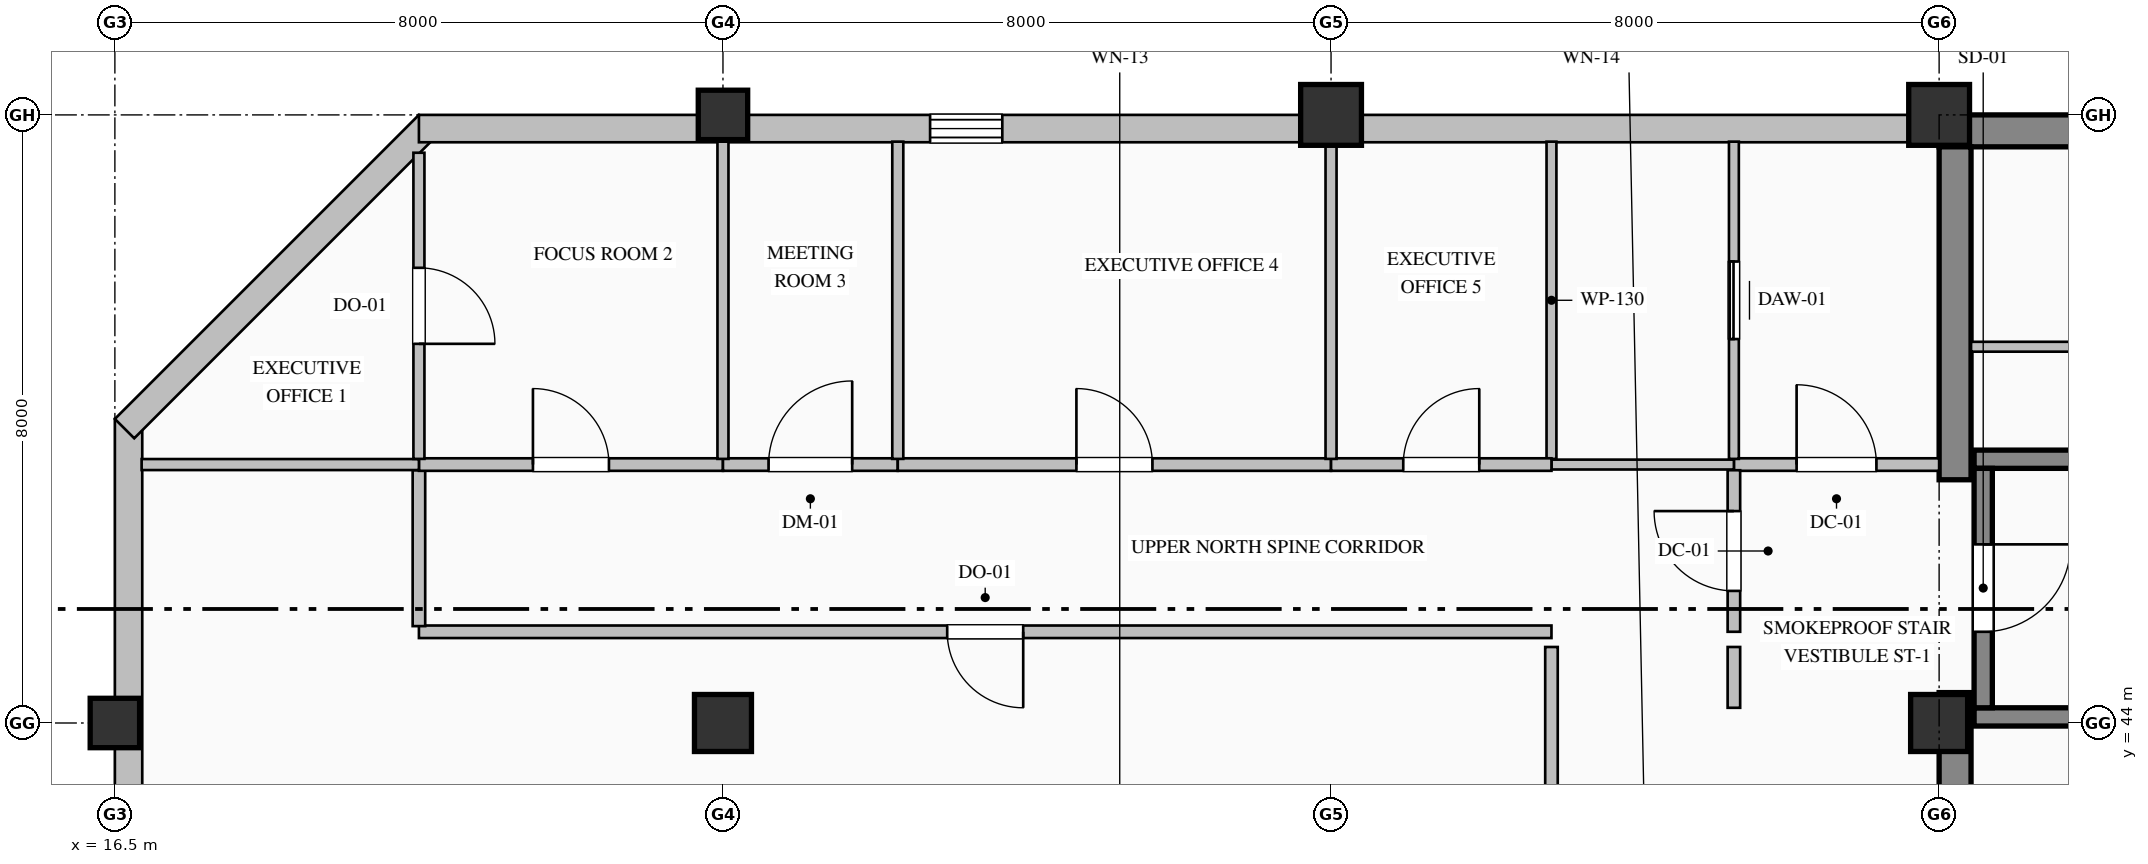
"""IFC4 building model, lengths in metres.
Left out: names, types, materials, properties, quantities, classifications, styles, units other than length and angle.
Written with IfcOpenShell. Run it as: python <this file> out.ifc"""

import sys

from ifc_helpers import new_model, si_unit, direction, frame, frame_2d, origin, origin_2d, place, context, subcontext, project, spatial, rectangle, hollow_rectangle, extrude, element, fill, save


model = new_model("IFC4")
c1 = context("Model", 3, precision=1e-05, world=origin(), true_north=direction((0.0, 1.0)))
c2 = subcontext(c1, "Body", "Model", "MODEL_VIEW")
j1 = project(units=[si_unit("LENGTHUNIT", "METRE"), si_unit("PLANEANGLEUNIT", "RADIAN")], contexts=[c1])
p1 = place(None, origin())
s1 = spatial("IfcSite", under=j1, at=p1, CompositionType="ELEMENT")
p2 = place(p1, origin())
s2 = spatial("IfcBuilding", under=s1, at=p2, CompositionType="ELEMENT")
p3 = place(p2, frame((0.0, 0.0, 299.2)))
s3 = spatial("IfcBuildingStorey", under=s2, at=p3, CompositionType="ELEMENT", Elevation=299.2)
p4 = place(p3, frame((40.5, 51.79, 0.0), z_axis=(0.0, 0.0, 1.0), x_axis=(1.0, 0.0, 0.0)))
e1 = element("IfcWall", 1, at=p4, inside=s3, PredefinedType="SHEAR", context=c2, shape_type="SweptSolid", body=[
    extrude(rectangle(XDim=23.5, YDim=0.42, at=frame_2d((11.75, 0.0))), origin(), (0.0, 0.0, 1.0), 3.785),
])
p5 = place(p3, frame((40.71, 36.42, 0.0), z_axis=(0.0, 0.0, 1.0), x_axis=(0.0, 1.0, 0.0)))
e2 = element("IfcWall", 2, at=p5, inside=s3, PredefinedType="SHEAR", context=c2, shape_type="SweptSolid", body=[
    extrude(rectangle(XDim=7.98, YDim=0.42, at=frame_2d((3.99, 0.0))), origin(), (0.0, 0.0, 1.0), 3.785),
])
p6 = place(p3, frame((40.71, 47.2, 0.0), z_axis=(0.0, 0.0, 1.0), x_axis=(0.0, 1.0, 0.0)))
e3 = element("IfcWall", 3, at=p6, inside=s3, PredefinedType="SHEAR", context=c2, shape_type="SweptSolid", body=[
    extrude(rectangle(XDim=4.38, YDim=0.42, at=frame_2d((2.19, 0.0))), origin(), (0.0, 0.0, 1.0), 3.785),
])
p7 = place(p3, frame((16.5, 44.0, 0.0), z_axis=(0.0, 0.0, 1.0), x_axis=(1.0, 0.0, 0.0)))
e4 = element("IfcColumn", 4, at=p7, inside=s3, PredefinedType="COLUMN", context=c2, shape_type="SweptSolid", body=[
    extrude(hollow_rectangle(XDim=0.65, YDim=0.65, WallThickness=0.028, at=origin_2d()), origin(), (0.0, 0.0, 1.0), 4.0),
])
p8 = place(p3, frame((24.5, 44.0, 0.0), z_axis=(0.0, 0.0, 1.0), x_axis=(1.0, 0.0, 0.0)))
e5 = element("IfcColumn", 5, at=p8, inside=s3, PredefinedType="COLUMN", context=c2, shape_type="SweptSolid", body=[
    extrude(rectangle(XDim=0.75, YDim=0.75, at=origin_2d()), origin(), (0.0, 0.0, 1.0), 4.0),
])
p9 = place(p3, frame((24.5, 52.0, 0.0), z_axis=(0.0, 0.0, 1.0), x_axis=(1.0, 0.0, 0.0)))
e6 = element("IfcColumn", 6, at=p9, inside=s3, PredefinedType="COLUMN", context=c2, shape_type="SweptSolid", body=[
    extrude(hollow_rectangle(XDim=0.65, YDim=0.65, WallThickness=0.028, at=origin_2d()), origin(), (0.0, 0.0, 1.0), 4.0),
])
p10 = place(p3, frame((32.5, 52.0, 0.0), z_axis=(0.0, 0.0, 1.0), x_axis=(1.0, 0.0, 0.0)))
e7 = element("IfcColumn", 7, at=p10, inside=s3, PredefinedType="COLUMN", context=c2, shape_type="SweptSolid", body=[
    extrude(hollow_rectangle(XDim=0.8, YDim=0.8, WallThickness=0.032, at=origin_2d()), origin(), (0.0, 0.0, 1.0), 4.0),
])
p11 = place(p3, frame((40.5, 44.0, 0.0), z_axis=(0.0, 0.0, 1.0), x_axis=(1.0, 0.0, 0.0)))
e8 = element("IfcColumn", 8, at=p11, inside=s3, PredefinedType="COLUMN", context=c2, shape_type="SweptSolid", body=[
    extrude(rectangle(XDim=0.75, YDim=0.75, at=origin_2d()), origin(), (0.0, 0.0, 1.0), 4.0),
])
p12 = place(p3, frame((40.5, 52.0, 0.0), z_axis=(0.0, 0.0, 1.0), x_axis=(1.0, 0.0, 0.0)))
e9 = element("IfcColumn", 9, at=p12, inside=s3, PredefinedType="COLUMN", context=c2, shape_type="SweptSolid", body=[
    extrude(hollow_rectangle(XDim=0.8, YDim=0.8, WallThickness=0.032, at=origin_2d()), origin(), (0.0, 0.0, 1.0), 4.0),
])
p13 = place(p3, frame((16.68, 32.0, 0.0), z_axis=(0.0, 0.0, 1.0), x_axis=(0.0, 1.0, 0.0)))
e10 = element("IfcWall", 10, at=p13, inside=s3, PredefinedType="SOLIDWALL", context=c2, shape_type="SweptSolid", body=[
    extrude(rectangle(XDim=16.0, YDim=0.36, at=frame_2d((8.0, 0.0))), origin(), (0.0, 0.0, 1.0), 3.335),
])
p14 = place(p13, frame((6.675, 0.0, 0.8)))
e11 = element("IfcOpeningElement", 11, at=p14, cuts=e10, PredefinedType="OPENING", context=c2, shape_type="SweptSolid", body=[
    extrude(rectangle(XDim=1.05, YDim=2.15, at=frame_2d((0.525, 1.075))), frame((0.0, 0.19, 0.0), z_axis=(0.0, -1.0, 0.0), x_axis=(1.0, 0.0, 0.0)), (0.0, 0.0, 1.0), 0.38),
])
p15 = place(p3, frame((16.627, 47.873, 0.0), z_axis=(0.0, 0.0, 1.0), x_axis=(0.707106781187, 0.707106781187, 0.0)))
e12 = element("IfcWall", 12, at=p15, inside=s3, PredefinedType="SOLIDWALL", context=c2, shape_type="SweptSolid", body=[
    extrude(rectangle(XDim=5.657, YDim=0.36, at=frame_2d((2.828, 0.0))), origin(), (0.0, 0.0, 1.0), 3.785),
])
p16 = place(p3, frame((20.5, 51.82, 0.0), z_axis=(0.0, 0.0, 1.0), x_axis=(1.0, 0.0, 0.0)))
e13 = element("IfcWall", 13, at=p16, inside=s3, PredefinedType="SOLIDWALL", context=c2, shape_type="SweptSolid", body=[
    extrude(rectangle(XDim=20.02, YDim=0.36, at=frame_2d((10.01, 0.0))), origin(), (0.0, 0.0, 1.0), 3.335),
])
p17 = place(p16, frame((6.725, 0.0, 0.9)))
e14 = element("IfcOpeningElement", 14, at=p17, cuts=e13, PredefinedType="OPENING", context=c2, shape_type="SweptSolid", body=[
    extrude(rectangle(XDim=0.95, YDim=1.85, at=frame_2d((0.475, 0.925))), frame((0.0, 0.19, 0.0), z_axis=(0.0, -1.0, 0.0), x_axis=(1.0, 0.0, 0.0)), (0.0, 0.0, 1.0), 0.38),
])
for number, where, z_axis, x_axis in (
    (15, (40.96, 47.47, 0.0), (0.0, 0.0, 1.0), (1.0, 0.0, 0.0)),
    (16, (49.04, 44.08, 0.0), (0.0, 0.0, 1.0), (-1.0, 0.0, 0.0)),
):
    element("IfcWall", number, at=place(p3, frame(where, z_axis=z_axis, x_axis=x_axis)), inside=s3, PredefinedType="SOLIDWALL", context=c2, shape_type="SweptSolid", body=[
        extrude(rectangle(XDim=8.08, YDim=0.24, at=frame_2d((4.04, 0.0))), origin(), (0.0, 0.0, 1.0), 4.0),
    ])
p18 = place(p3, frame((41.08, 47.35, 0.0), z_axis=(0.0, 0.0, 1.0), x_axis=(0.0, -1.0, 0.0)))
e17 = element("IfcWall", 17, at=p18, inside=s3, PredefinedType="SOLIDWALL", context=c2, shape_type="SweptSolid", body=[
    extrude(rectangle(XDim=3.15, YDim=0.24, at=frame_2d((1.575, 0.0))), origin(), (0.0, 0.0, 1.0), 4.0),
])
p19 = place(p18, frame((1.0, 0.0, 0.0)))
e18 = element("IfcOpeningElement", 18, at=p19, cuts=e17, PredefinedType="OPENING", context=c2, shape_type="SweptSolid", body=[
    extrude(rectangle(XDim=1.15, YDim=2.2, at=frame_2d((0.575, 1.1))), frame((0.0, 0.13, 0.0), z_axis=(0.0, -1.0, 0.0), x_axis=(1.0, 0.0, 0.0)), (0.0, 0.0, 1.0), 0.26),
])
p20 = place(p3, frame((37.8, 47.4, 0.0), z_axis=(0.0, 0.0, 1.0), x_axis=(1.0, 0.0, 0.0)))
e19 = element("IfcWall", 19, at=p20, inside=s3, PredefinedType="PARTITIONING", context=c2, shape_type="SweptSolid", body=[
    extrude(rectangle(XDim=2.7, YDim=0.165, at=frame_2d((1.35, 0.0))), origin(), (0.0, 0.0, 1.0), 3.785),
])
p21 = place(p20, frame((0.825, 0.0, 0.0)))
e20 = element("IfcOpeningElement", 20, at=p21, cuts=e19, PredefinedType="OPENING", context=c2, shape_type="SweptSolid", body=[
    extrude(rectangle(XDim=1.05, YDim=2.15, at=frame_2d((0.525, 1.075))), frame((0.0, 0.093, 0.0), z_axis=(0.0, -1.0, 0.0), x_axis=(1.0, 0.0, 0.0)), (0.0, 0.0, 1.0), 0.185),
])
p22 = place(p3, frame((37.8, 45.2, 0.0), z_axis=(0.0, 0.0, 1.0), x_axis=(0.0, 1.0, 0.0)))
e21 = element("IfcWall", 21, at=p22, inside=s3, PredefinedType="PARTITIONING", context=c2, shape_type="SweptSolid", body=[
    extrude(rectangle(XDim=2.125, YDim=0.165, at=frame_2d((1.063, 0.0))), origin(), (0.0, 0.0, 1.0), 3.785),
])
p23 = place(p22, frame((0.538, 0.0, 0.0)))
e22 = element("IfcOpeningElement", 22, at=p23, cuts=e21, PredefinedType="OPENING", context=c2, shape_type="SweptSolid", body=[
    extrude(rectangle(XDim=1.05, YDim=2.15, at=frame_2d((0.525, 1.075))), frame((0.0, 0.093, 0.0), z_axis=(0.0, -1.0, 0.0), x_axis=(1.0, 0.0, 0.0)), (0.0, 0.0, 1.0), 0.185),
])
p24 = place(p3, frame((37.8, 44.2, 0.0), z_axis=(0.0, 0.0, 1.0), x_axis=(0.0, 1.0, 0.0)))
e23 = element("IfcWall", 23, at=p24, inside=s3, PredefinedType="PARTITIONING", context=c2, shape_type="SweptSolid", body=[
    extrude(rectangle(XDim=0.8, YDim=0.165, at=frame_2d((0.4, 0.0))), origin(), (0.0, 0.0, 1.0), 3.785),
])
p25 = place(p3, frame((37.8, 47.475, 0.0), z_axis=(0.0, 0.0, 1.0), x_axis=(0.0, 1.0, 0.0)))
e24 = element("IfcWall", 24, at=p25, inside=s3, PredefinedType="PARTITIONING", context=c2, shape_type="SweptSolid", body=[
    extrude(rectangle(XDim=4.173, YDim=0.13, at=frame_2d((2.087, 0.0))), origin(), (0.0, 0.0, 1.0), 3.785),
])
p26 = place(p25, frame((1.577, 0.0, 0.0)))
e25 = element("IfcOpeningElement", 25, at=p26, cuts=e24, PredefinedType="OPENING", context=c2, shape_type="SweptSolid", body=[
    extrude(rectangle(XDim=1.02, YDim=2.15, at=frame_2d((0.51, 1.075))), frame((0.0, 0.075, 0.0), z_axis=(0.0, -1.0, 0.0), x_axis=(1.0, 0.0, 0.0)), (0.0, 0.0, 1.0), 0.15),
])
p27 = place(p3, frame((37.8, 47.4, 0.0), z_axis=(0.0, 0.0, 1.0), x_axis=(-1.0, 0.0, 0.0)))
e26 = element("IfcWall", 26, at=p27, inside=s3, PredefinedType="PARTITIONING", context=c2, shape_type="SweptSolid", body=[
    extrude(rectangle(XDim=2.4, YDim=0.13, at=frame_2d((1.2, 0.0))), origin(), (0.0, 0.0, 1.0), 3.785),
])
p28 = place(p3, frame((35.4, 47.475, 0.0), z_axis=(0.0, 0.0, 1.0), x_axis=(0.0, 1.0, 0.0)))
e27 = element("IfcWall", 27, at=p28, inside=s3, PredefinedType="PARTITIONING", context=c2, shape_type="SweptSolid", body=[
    extrude(rectangle(XDim=4.173, YDim=0.13, at=frame_2d((2.087, 0.0))), origin(), (0.0, 0.0, 1.0), 3.785),
])
p29 = place(p3, frame((40.92, 48.95, 0.0), z_axis=(0.0, 0.0, 1.0), x_axis=(1.0, 0.0, 0.0)))
e28 = element("IfcWall", 28, at=p29, inside=s3, PredefinedType="PARTITIONING", context=c2, shape_type="SweptSolid", body=[
    extrude(rectangle(XDim=4.28, YDim=0.13, at=frame_2d((2.14, 0.0))), origin(), (0.0, 0.0, 1.0), 3.785),
])
p30 = place(p29, frame((1.68, 0.0, 0.0)))
e29 = element("IfcOpeningElement", 29, at=p30, cuts=e28, PredefinedType="OPENING", context=c2, shape_type="SweptSolid", body=[
    extrude(rectangle(XDim=0.92, YDim=2.15, at=frame_2d((0.46, 1.075))), frame((0.0, 0.075, 0.0), z_axis=(0.0, -1.0, 0.0), x_axis=(1.0, 0.0, 0.0)), (0.0, 0.0, 1.0), 0.15),
])
p31 = place(p3, frame((35.4, 45.2, 0.0), z_axis=(0.0, 0.0, 1.0), x_axis=(-1.0, 0.0, 0.0)))
e30 = element("IfcWall", 30, at=p31, inside=s3, PredefinedType="PARTITIONING", context=c2, shape_type="SweptSolid", body=[
    extrude(rectangle(XDim=14.9, YDim=0.165, at=frame_2d((7.45, 0.0))), origin(), (0.0, 0.0, 1.0), 3.785),
])
p32 = place(p31, frame((6.95, 0.0, 0.0)))
e31 = element("IfcOpeningElement", 31, at=p32, cuts=e30, PredefinedType="OPENING", context=c2, shape_type="SweptSolid", body=[
    extrude(rectangle(XDim=1.0, YDim=2.15, at=frame_2d((0.5, 1.075))), frame((0.0, 0.093, 0.0), z_axis=(0.0, -1.0, 0.0), x_axis=(1.0, 0.0, 0.0)), (0.0, 0.0, 1.0), 0.185),
])
p33 = place(p3, frame((20.5, 45.274, 0.0), z_axis=(0.0, 0.0, 1.0), x_axis=(0.0, 1.0, 0.0)))
e32 = element("IfcWall", 32, at=p33, inside=s3, PredefinedType="PARTITIONING", context=c2, shape_type="SweptSolid", body=[
    extrude(rectangle(XDim=2.051, YDim=0.165, at=frame_2d((1.025, 0.0))), origin(), (0.0, 0.0, 1.0), 3.785),
])
p34 = place(p3, frame((20.5, 47.4, 0.0), z_axis=(0.0, 0.0, 1.0), x_axis=(1.0, 0.0, 0.0)))
e33 = element("IfcWall", 33, at=p34, inside=s3, PredefinedType="PARTITIONING", context=c2, shape_type="SweptSolid", body=[
    extrude(rectangle(XDim=4.0, YDim=0.165, at=frame_2d((2.0, 0.0))), origin(), (0.0, 0.0, 1.0), 3.785),
])
p35 = place(p34, frame((1.5, 0.0, 0.0)))
e34 = element("IfcOpeningElement", 34, at=p35, cuts=e33, PredefinedType="OPENING", context=c2, shape_type="SweptSolid", body=[
    extrude(rectangle(XDim=1.0, YDim=2.15, at=frame_2d((0.5, 1.075))), frame((0.0, 0.093, 0.0), z_axis=(0.0, -1.0, 0.0), x_axis=(1.0, 0.0, 0.0)), (0.0, 0.0, 1.0), 0.185),
])
p36 = place(p3, frame((24.5, 47.4, 0.0), z_axis=(0.0, 0.0, 1.0), x_axis=(1.0, 0.0, 0.0)))
e35 = element("IfcWall", 35, at=p36, inside=s3, PredefinedType="PARTITIONING", context=c2, shape_type="SweptSolid", body=[
    extrude(rectangle(XDim=2.3, YDim=0.165, at=frame_2d((1.15, 0.0))), origin(), (0.0, 0.0, 1.0), 3.785),
])
p37 = place(p36, frame((0.6, 0.0, 0.0)))
e36 = element("IfcOpeningElement", 36, at=p37, cuts=e35, PredefinedType="OPENING", context=c2, shape_type="SweptSolid", body=[
    extrude(rectangle(XDim=1.1, YDim=2.2, at=frame_2d((0.55, 1.1))), frame((0.0, 0.093, 0.0), z_axis=(0.0, -1.0, 0.0), x_axis=(1.0, 0.0, 0.0)), (0.0, 0.0, 1.0), 0.185),
])
p38 = place(p3, frame((26.8, 47.4, 0.0), z_axis=(0.0, 0.0, 1.0), x_axis=(1.0, 0.0, 0.0)))
e37 = element("IfcWall", 37, at=p38, inside=s3, PredefinedType="PARTITIONING", context=c2, shape_type="SweptSolid", body=[
    extrude(rectangle(XDim=5.7, YDim=0.165, at=frame_2d((2.85, 0.0))), origin(), (0.0, 0.0, 1.0), 3.785),
])
p39 = place(p38, frame((2.35, 0.0, 0.0)))
e38 = element("IfcOpeningElement", 38, at=p39, cuts=e37, PredefinedType="OPENING", context=c2, shape_type="SweptSolid", body=[
    extrude(rectangle(XDim=1.0, YDim=2.15, at=frame_2d((0.5, 1.075))), frame((0.0, 0.093, 0.0), z_axis=(0.0, -1.0, 0.0), x_axis=(1.0, 0.0, 0.0)), (0.0, 0.0, 1.0), 0.185),
])
p40 = place(p3, frame((32.5, 47.4, 0.0), z_axis=(0.0, 0.0, 1.0), x_axis=(1.0, 0.0, 0.0)))
e39 = element("IfcWall", 39, at=p40, inside=s3, PredefinedType="PARTITIONING", context=c2, shape_type="SweptSolid", body=[
    extrude(rectangle(XDim=2.9, YDim=0.165, at=frame_2d((1.45, 0.0))), origin(), (0.0, 0.0, 1.0), 3.785),
])
p41 = place(p40, frame((0.95, 0.0, 0.0)))
e40 = element("IfcOpeningElement", 40, at=p41, cuts=e39, PredefinedType="OPENING", context=c2, shape_type="SweptSolid", body=[
    extrude(rectangle(XDim=1.0, YDim=2.15, at=frame_2d((0.5, 1.075))), frame((0.0, 0.093, 0.0), z_axis=(0.0, -1.0, 0.0), x_axis=(1.0, 0.0, 0.0)), (0.0, 0.0, 1.0), 0.185),
])
p42 = place(p3, frame((35.4, 33.6, 0.0), z_axis=(0.0, 0.0, 1.0), x_axis=(0.0, 1.0, 0.0)))
e41 = element("IfcWall", 41, at=p42, inside=s3, PredefinedType="PARTITIONING", context=c2, shape_type="SweptSolid", body=[
    extrude(rectangle(XDim=11.4, YDim=0.165, at=frame_2d((5.7, 0.0))), origin(), (0.0, 0.0, 1.0), 3.785),
])
p43 = place(p3, frame((16.852, 47.4, 0.0), z_axis=(0.0, 0.0, 1.0), x_axis=(1.0, 0.0, 0.0)))
e42 = element("IfcWall", 42, at=p43, inside=s3, PredefinedType="PARTITIONING", context=c2, shape_type="SweptSolid", body=[
    extrude(rectangle(XDim=3.648, YDim=0.145, at=frame_2d((1.824, 0.0))), origin(), (0.0, 0.0, 1.0), 3.785),
])
p44 = place(p3, frame((20.5, 51.502, 0.0), z_axis=(0.0, 0.0, 1.0), x_axis=(0.0, -1.0, 0.0)))
e43 = element("IfcWall", 43, at=p44, inside=s3, PredefinedType="PARTITIONING", context=c2, shape_type="SweptSolid", body=[
    extrude(rectangle(XDim=4.028, YDim=0.145, at=frame_2d((2.014, 0.0))), origin(), (0.0, 0.0, 1.0), 3.785),
])
p45 = place(p44, frame((1.514, 0.0, 0.0)))
e44 = element("IfcOpeningElement", 44, at=p45, cuts=e43, PredefinedType="OPENING", context=c2, shape_type="SweptSolid", body=[
    extrude(rectangle(XDim=1.0, YDim=2.15, at=frame_2d((0.5, 1.075))), frame((0.0, 0.083, 0.0), z_axis=(0.0, -1.0, 0.0), x_axis=(1.0, 0.0, 0.0)), (0.0, 0.0, 1.0), 0.165),
])
p46 = place(p3, frame((24.5, 51.648, 0.0), z_axis=(0.0, 0.0, 1.0), x_axis=(0.0, -1.0, 0.0)))
e45 = element("IfcWall", 45, at=p46, inside=s3, PredefinedType="PARTITIONING", context=c2, shape_type="SweptSolid", body=[
    extrude(rectangle(XDim=4.173, YDim=0.145, at=frame_2d((2.087, 0.0))), origin(), (0.0, 0.0, 1.0), 3.177),
])
for number, where, z_axis, x_axis in (
    (46, (26.8, 51.648, 0.0), (0.0, 0.0, 1.0), (0.0, -1.0, 0.0)),
    (47, (32.5, 51.648, 0.0), (0.0, 0.0, 1.0), (0.0, -1.0, 0.0)),
):
    element("IfcWall", number, at=place(p3, frame(where, z_axis=z_axis, x_axis=x_axis)), inside=s3, PredefinedType="PARTITIONING", context=c2, shape_type="SweptSolid", body=[
        extrude(rectangle(XDim=4.173, YDim=0.145, at=frame_2d((2.087, 0.0))), origin(), (0.0, 0.0, 1.0), 3.785),
    ])
p47 = place(p17, origin())
e48 = element("IfcWindow", 48, at=p47, inside=s3, PartitioningType="SINGLE_PANEL", PredefinedType="WINDOW", context=c2, shape_type="SweptSolid", body=[
    extrude(rectangle(XDim=0.95, YDim=1.85, at=frame_2d((0.475, 0.925))), frame((0.0, 0.15, 0.0), z_axis=(0.0, -1.0, 0.0), x_axis=(1.0, 0.0, 0.0)), (0.0, 0.0, 1.0), 0.06),
])
fill(e14, e48)
p48 = place(p19, origin())
e49 = element("IfcDoor", 49, at=p48, inside=s3, OperationType="SINGLE_SWING_LEFT", PredefinedType="DOOR", context=c2, shape_type="SweptSolid", body=[
    extrude(rectangle(XDim=1.15, YDim=2.2, at=frame_2d((0.575, 1.1))), frame((0.0, 0.025, 0.0), z_axis=(0.0, -1.0, 0.0), x_axis=(1.0, 0.0, 0.0)), (0.0, 0.0, 1.0), 0.05),
])
fill(e18, e49)
p49 = place(p21, origin())
e50 = element("IfcDoor", 50, at=p49, inside=s3, OperationType="SINGLE_SWING_LEFT", PredefinedType="DOOR", context=c2, shape_type="SweptSolid", body=[
    extrude(rectangle(XDim=1.05, YDim=2.15, at=frame_2d((0.525, 1.075))), frame((0.0, 0.025, 0.0), z_axis=(0.0, -1.0, 0.0), x_axis=(1.0, 0.0, 0.0)), (0.0, 0.0, 1.0), 0.05),
])
fill(e20, e50)
p50 = place(p23, origin())
e51 = element("IfcDoor", 51, at=p50, inside=s3, OperationType="SINGLE_SWING_RIGHT", PredefinedType="DOOR", context=c2, shape_type="SweptSolid", body=[
    extrude(rectangle(XDim=1.05, YDim=2.15, at=frame_2d((0.525, 1.075))), frame((0.0, 0.025, 0.0), z_axis=(0.0, -1.0, 0.0), x_axis=(1.0, 0.0, 0.0)), (0.0, 0.0, 1.0), 0.05),
])
fill(e22, e51)
p51 = place(p26, origin())
e52 = element("IfcDoor", 52, at=p51, inside=s3, OperationType="SLIDING_TO_LEFT", PredefinedType="DOOR", context=c2, shape_type="SweptSolid", body=[
    extrude(rectangle(XDim=1.02, YDim=2.15, at=frame_2d((0.51, 1.075))), frame((0.0, 0.025, 0.0), z_axis=(0.0, -1.0, 0.0), x_axis=(1.0, 0.0, 0.0)), (0.0, 0.0, 1.0), 0.05),
])
fill(e25, e52)
p52 = place(p32, origin())
e53 = element("IfcDoor", 53, at=p52, inside=s3, OperationType="SINGLE_SWING_LEFT", PredefinedType="DOOR", context=c2, shape_type="SweptSolid", body=[
    extrude(rectangle(XDim=1.0, YDim=2.15, at=frame_2d((0.5, 1.075))), frame((0.0, 0.025, 0.0), z_axis=(0.0, -1.0, 0.0), x_axis=(1.0, 0.0, 0.0)), (0.0, 0.0, 1.0), 0.05),
])
fill(e31, e53)
p53 = place(p45, origin())
e54 = element("IfcDoor", 54, at=p53, inside=s3, OperationType="SINGLE_SWING_RIGHT", PredefinedType="DOOR", context=c2, shape_type="SweptSolid", body=[
    extrude(rectangle(XDim=1.0, YDim=2.15, at=frame_2d((0.5, 1.075))), frame((0.0, 0.025, 0.0), z_axis=(0.0, -1.0, 0.0), x_axis=(1.0, 0.0, 0.0)), (0.0, 0.0, 1.0), 0.05),
])
fill(e44, e54)
p54 = place(p35, origin())
e55 = element("IfcDoor", 55, at=p54, inside=s3, OperationType="SINGLE_SWING_LEFT", PredefinedType="DOOR", context=c2, shape_type="SweptSolid", body=[
    extrude(rectangle(XDim=1.0, YDim=2.15, at=frame_2d((0.5, 1.075))), frame((0.0, 0.025, 0.0), z_axis=(0.0, -1.0, 0.0), x_axis=(1.0, 0.0, 0.0)), (0.0, 0.0, 1.0), 0.05),
])
fill(e34, e55)
p55 = place(p37, origin())
e56 = element("IfcDoor", 56, at=p55, inside=s3, OperationType="SINGLE_SWING_RIGHT", PredefinedType="DOOR", context=c2, shape_type="SweptSolid", body=[
    extrude(rectangle(XDim=1.1, YDim=2.2, at=frame_2d((0.55, 1.1))), frame((0.0, 0.025, 0.0), z_axis=(0.0, -1.0, 0.0), x_axis=(1.0, 0.0, 0.0)), (0.0, 0.0, 1.0), 0.05),
])
fill(e36, e56)
p56 = place(p39, origin())
e57 = element("IfcDoor", 57, at=p56, inside=s3, OperationType="SINGLE_SWING_LEFT", PredefinedType="DOOR", context=c2, shape_type="SweptSolid", body=[
    extrude(rectangle(XDim=1.0, YDim=2.15, at=frame_2d((0.5, 1.075))), frame((0.0, 0.025, 0.0), z_axis=(0.0, -1.0, 0.0), x_axis=(1.0, 0.0, 0.0)), (0.0, 0.0, 1.0), 0.05),
])
fill(e38, e57)
p57 = place(p41, origin())
e58 = element("IfcDoor", 58, at=p57, inside=s3, OperationType="SINGLE_SWING_RIGHT", PredefinedType="DOOR", context=c2, shape_type="SweptSolid", body=[
    extrude(rectangle(XDim=1.0, YDim=2.15, at=frame_2d((0.5, 1.075))), frame((0.0, 0.025, 0.0), z_axis=(0.0, -1.0, 0.0), x_axis=(1.0, 0.0, 0.0)), (0.0, 0.0, 1.0), 0.05),
])
fill(e40, e58)
save(model, sys.argv[1])
